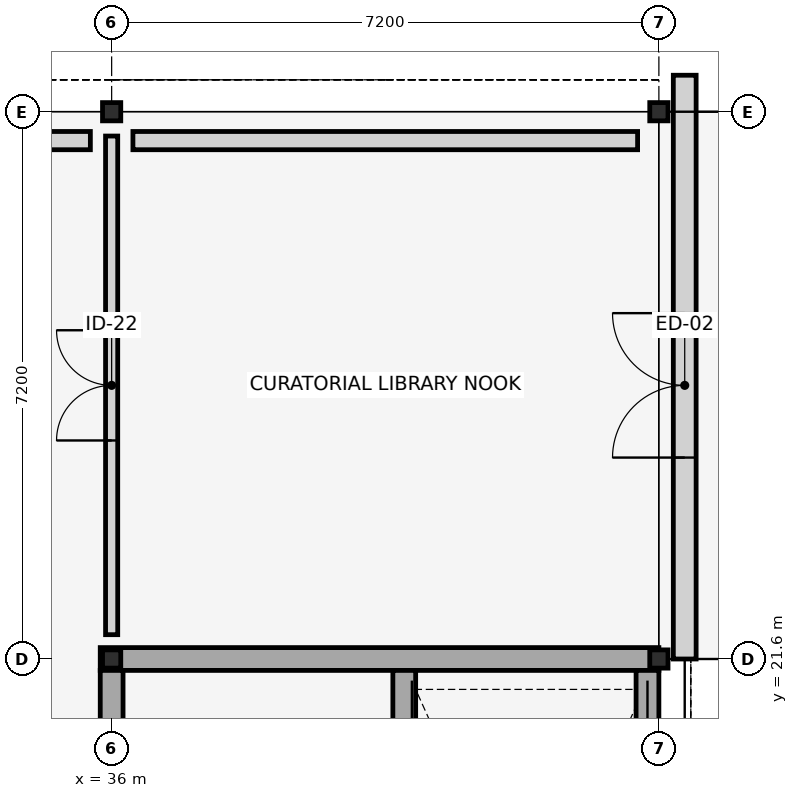
"""IFC4 building model, lengths in metres.
Left out: names, types, materials, properties, quantities, classifications, styles, units other than length and angle.
Written with IfcOpenShell. Run it as: python <this file> out.ifc"""

import sys

from ifc_helpers import new_model, si_unit, direction, frame, frame_2d, origin, origin_2d, place, context, subcontext, project, spatial, rectangle, i_section, extrude, element, fill, save


model = new_model("IFC4")
c1 = context("Model", 3, precision=1e-05, world=origin(), true_north=direction((0.0, 1.0)))
c2 = subcontext(c1, "Body", "Model", "MODEL_VIEW")
j1 = project(units=[si_unit("LENGTHUNIT", "METRE"), si_unit("PLANEANGLEUNIT", "RADIAN")], contexts=[c1])
p1 = place(None, origin())
s1 = spatial("IfcSite", under=j1, at=p1, CompositionType="ELEMENT")
p2 = place(p1, origin())
s2 = spatial("IfcBuilding", under=s1, at=p2, CompositionType="ELEMENT")
p3 = place(p2, frame((0.0, 0.0, 8.7)))
s3 = spatial("IfcBuildingStorey", under=s2, at=p3, CompositionType="ELEMENT", Elevation=8.7)
for number, where, z_axis, x_axis in (
    (1, (36.0, 21.6, 0.0), (0.0, 0.0, 1.0), (1.0, 0.0, 0.0)),
    (2, (36.0, 28.8, 0.0), (0.0, 0.0, 1.0), (0.0, 1.0, 0.0)),
    (3, (43.2, 21.6, 0.0), (0.0, 0.0, 1.0), (0.0, 1.0, 0.0)),
    (4, (43.2, 28.8, 0.0), (0.0, 0.0, 1.0), (1.0, 0.0, 0.0)),
):
    element("IfcColumn", number, at=place(p3, frame(where, z_axis=z_axis, x_axis=x_axis)), inside=s3, PredefinedType="COLUMN", context=c2, shape_type="SweptSolid", body=[
        extrude(i_section(OverallWidth=0.24, OverallDepth=0.24, WebThickness=0.01, FlangeThickness=0.017, FilletRadius=0.021, at=origin_2d()), origin(), (0.0, 0.0, 1.0), 4.2),
    ])
p4 = place(p3, frame((43.54, 21.6, 0.0), z_axis=(0.0, 0.0, 1.0), x_axis=(0.0, 1.0, 0.0)))
e5 = element("IfcWall", 5, at=p4, inside=s3, PredefinedType="STANDARD", context=c2, shape_type="SweptSolid", body=[
    extrude(rectangle(XDim=7.68, YDim=0.3, at=frame_2d((3.84, 0.0))), origin(), (0.0, 0.0, 1.0), 3.65),
])
p5 = place(p4, frame((2.65, 0.0, 0.0)))
e6 = element("IfcOpeningElement", 6, at=p5, cuts=e5, PredefinedType="OPENING", context=c2, shape_type="SweptSolid", body=[
    extrude(rectangle(XDim=1.9, YDim=2.45, at=frame_2d((0.95, 1.225))), frame((0.0, 0.16, 0.0), z_axis=(0.0, -1.0, 0.0), x_axis=(1.0, 0.0, 0.0)), (0.0, 0.0, 1.0), 0.32),
])
for number, where, z_axis, x_axis in (
    (7, (42.92, 28.42, 0.0), (0.0, 0.0, 1.0), (-1.0, 0.0, 0.0)),
    (8, (35.72, 28.42, 0.0), (0.0, 0.0, 1.0), (-1.0, 0.0, 0.0)),
):
    element("IfcWall", number, at=place(p3, frame(where, z_axis=z_axis, x_axis=x_axis)), inside=s3, PredefinedType="STANDARD", context=c2, shape_type="SweptSolid", body=[
        extrude(rectangle(XDim=6.64, YDim=0.24, at=frame_2d((3.32, 0.0))), origin(), (0.0, 0.0, 1.0), 3.58),
    ])
p6 = place(p3, frame((35.85, 21.6, 0.0), z_axis=(0.0, 0.0, 1.0), x_axis=(1.0, 0.0, 0.0)))
e9 = element("IfcWall", 9, at=p6, inside=s3, PredefinedType="SHEAR", context=c2, shape_type="SweptSolid", body=[
    extrude(rectangle(XDim=7.35, YDim=0.3, at=frame_2d((3.675, 0.0))), origin(), (0.0, 0.0, 1.0), 3.96),
])
p7 = place(p3, frame((43.05, 7.35, 0.0), z_axis=(0.0, 0.0, 1.0), x_axis=(0.0, 1.0, 0.0)))
e10 = element("IfcWall", 10, at=p7, inside=s3, PredefinedType="SHEAR", context=c2, shape_type="SweptSolid", body=[
    extrude(rectangle(XDim=14.1, YDim=0.3, at=frame_2d((7.05, 0.0))), origin(), (0.0, 0.0, 1.0), 3.96),
])
p8 = place(p3, frame((36.0, 7.35, 0.0), z_axis=(0.0, 0.0, 1.0), x_axis=(0.0, 1.0, 0.0)))
e11 = element("IfcWall", 11, at=p8, inside=s3, PredefinedType="SHEAR", context=c2, shape_type="SweptSolid", body=[
    extrude(rectangle(XDim=14.1, YDim=0.3, at=frame_2d((7.05, 0.0))), origin(), (0.0, 0.0, 1.0), 3.96),
])
p9 = place(p8, frame((3.55, 0.0, 0.0)))
e12 = element("IfcOpeningElement", 12, at=p9, cuts=e11, PredefinedType="OPENING", context=c2, shape_type="SweptSolid", body=[
    extrude(rectangle(XDim=1.3, YDim=2.2, at=frame_2d((0.65, 1.1))), frame((0.0, 0.16, 0.0), z_axis=(0.0, -1.0, 0.0), x_axis=(1.0, 0.0, 0.0)), (0.0, 0.0, 1.0), 0.32),
])
p10 = place(p8, frame((7.85, 0.0, 0.0)))
e13 = element("IfcOpeningElement", 13, at=p10, cuts=e11, PredefinedType="OPENING", context=c2, shape_type="SweptSolid", body=[
    extrude(rectangle(XDim=1.05, YDim=2.15, at=frame_2d((0.525, 1.075))), frame((0.0, 0.16, 0.0), z_axis=(0.0, -1.0, 0.0), x_axis=(1.0, 0.0, 0.0)), (0.0, 0.0, 1.0), 0.32),
])
p11 = place(p8, frame((10.55, 0.0, 0.0)))
e14 = element("IfcOpeningElement", 14, at=p11, cuts=e11, PredefinedType="OPENING", context=c2, shape_type="SweptSolid", body=[
    extrude(rectangle(XDim=1.0, YDim=2.15, at=frame_2d((0.5, 1.075))), frame((0.0, 0.16, 0.0), z_axis=(0.0, -1.0, 0.0), x_axis=(1.0, 0.0, 0.0)), (0.0, 0.0, 1.0), 0.32),
])
p12 = place(p3, frame((39.85, 12.54, 0.0), z_axis=(0.0, 0.0, 1.0), x_axis=(0.0, 1.0, 0.0)))
e15 = element("IfcWall", 15, at=p12, inside=s3, PredefinedType="SHEAR", context=c2, shape_type="SweptSolid", body=[
    extrude(rectangle(XDim=8.91, YDim=0.3, at=frame_2d((4.455, 0.0))), origin(), (0.0, 0.0, 1.0), 3.96),
])
p13 = place(p3, frame((36.0, 21.92, 0.0), z_axis=(0.0, 0.0, 1.0), x_axis=(0.0, 1.0, 0.0)))
e16 = element("IfcWall", 16, at=p13, inside=s3, PredefinedType="PARTITIONING", context=c2, shape_type="SweptSolid", body=[
    extrude(rectangle(XDim=6.56, YDim=0.16, at=frame_2d((3.28, 0.0))), origin(), (0.0, 0.0, 1.0), 3.15),
])
p14 = place(p13, frame((2.555, 0.0, 0.0)))
e17 = element("IfcOpeningElement", 17, at=p14, cuts=e16, PredefinedType="OPENING", context=c2, shape_type="SweptSolid", body=[
    extrude(rectangle(XDim=1.45, YDim=2.35, at=frame_2d((0.725, 1.175))), frame((0.0, 0.09, 0.0), z_axis=(0.0, -1.0, 0.0), x_axis=(1.0, 0.0, 0.0)), (0.0, 0.0, 1.0), 0.18),
])
p15 = place(p5, origin())
e18 = element("IfcDoor", 18, at=p15, inside=s3, OperationType="DOUBLE_DOOR_SINGLE_SWING", PredefinedType="DOOR", context=c2, shape_type="SweptSolid", body=[
    extrude(rectangle(XDim=1.9, YDim=2.45, at=frame_2d((0.95, 1.225))), frame((0.0, 0.025, 0.0), z_axis=(0.0, -1.0, 0.0), x_axis=(1.0, 0.0, 0.0)), (0.0, 0.0, 1.0), 0.05),
])
fill(e6, e18)
p16 = place(p14, origin())
e19 = element("IfcDoor", 19, at=p16, inside=s3, OperationType="DOUBLE_DOOR_SINGLE_SWING", PredefinedType="DOOR", context=c2, shape_type="SweptSolid", body=[
    extrude(rectangle(XDim=1.45, YDim=2.35, at=frame_2d((0.725, 1.175))), frame((0.0, 0.025, 0.0), z_axis=(0.0, -1.0, 0.0), x_axis=(1.0, 0.0, 0.0)), (0.0, 0.0, 1.0), 0.05),
])
fill(e17, e19)
save(model, sys.argv[1])
